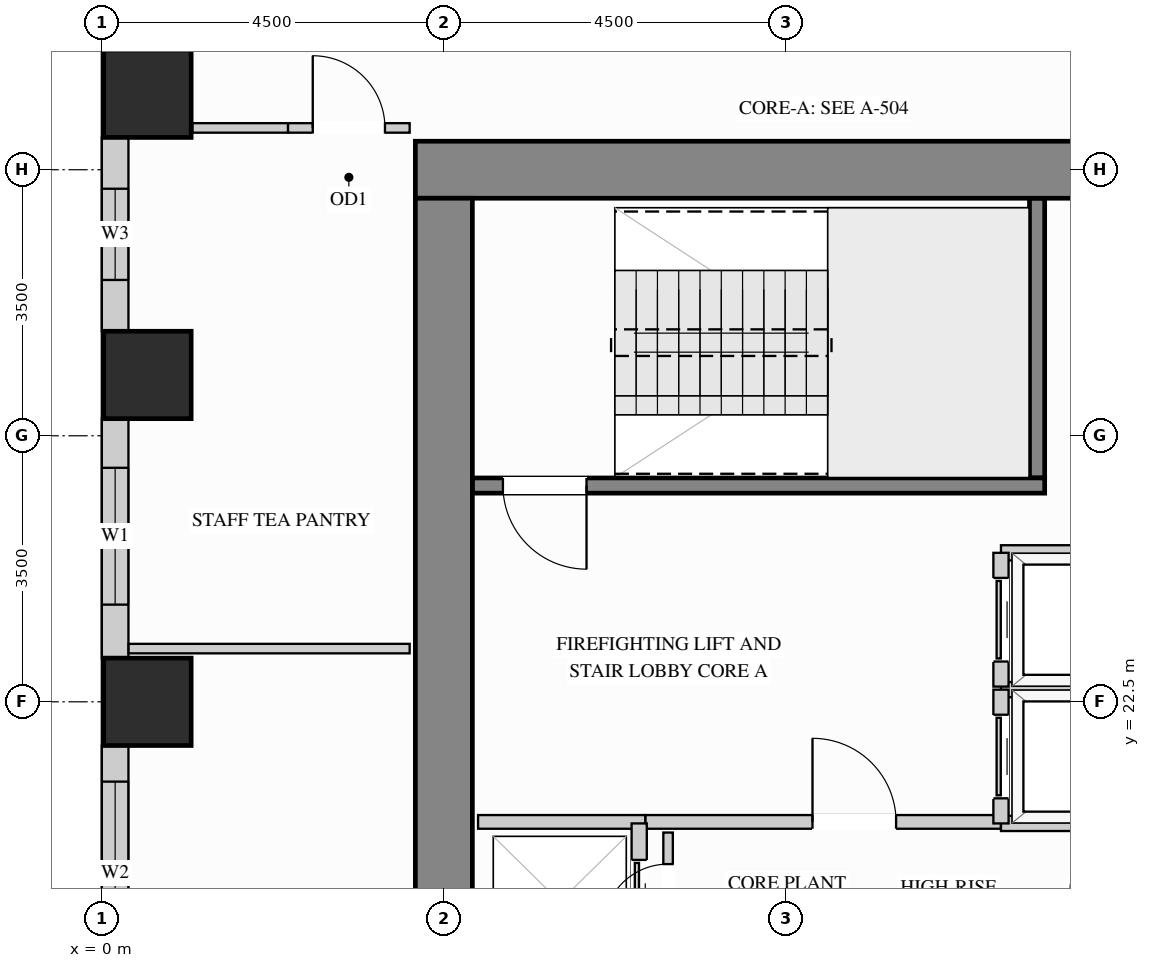
"""IFC4 building model, lengths in metres.
Left out: names, types, materials, properties, quantities, classifications, styles, units other than length and angle.
Written with IfcOpenShell. Run it as: python <this file> out.ifc"""

import sys

from ifc_helpers import new_model, si_unit, direction, frame, frame_2d, origin, origin_2d, place, context, subcontext, project, spatial, rectangle, extrude, source, transform, mapped, element, fill, save


model = new_model("IFC4")
c1 = context("Model", 3, precision=1e-05, world=origin(), true_north=direction((0.0, 1.0)))
c2 = subcontext(c1, "Body", "Model", "MODEL_VIEW")
j1 = project(units=[si_unit("LENGTHUNIT", "METRE"), si_unit("PLANEANGLEUNIT", "RADIAN")], contexts=[c1])
p1 = place(None, origin())
s1 = spatial("IfcSite", under=j1, at=p1, CompositionType="ELEMENT")
p2 = place(p1, origin())
s2 = spatial("IfcBuilding", under=s1, at=p2, CompositionType="ELEMENT")
p3 = place(p2, frame((0.0, 0.0, 109.8)))
s3 = spatial("IfcBuildingStorey", under=s2, at=p3, CompositionType="ELEMENT", Elevation=109.8)
m1 = source(origin(), c2, "Body", "SweptSolid", [
    extrude(rectangle(XDim=1.15, YDim=1.15, at=origin_2d()), origin(), (0.0, 0.0, 1.0), 3.38),
])
for number, where, z_axis, x_axis in (
    (1, (0.6, 22.5, 0.0), (0.0, 0.0, 1.0), (1.0, 0.0, 0.0)),
    (2, (0.6, 26.8, 0.0), (0.0, 0.0, 1.0), (1.0, 0.0, 0.0)),
    (3, (0.6, 30.5, 0.0), (0.0, 0.0, 1.0), (1.0, 0.0, 0.0)),
):
    element("IfcColumn", number, at=place(p3, frame(where, z_axis=z_axis, x_axis=x_axis)), inside=s3, PredefinedType="COLUMN", context=c2, shape_type="MappedRepresentation", body=[
        mapped(m1, transform((0.0, 0.0, 0.0), x_axis=(1.0, 0.0, 0.0), y_axis=(0.0, 1.0, 0.0), z_axis=(0.0, 0.0, 1.0))),
    ])
m2 = source(origin(), c2, "Body", "SweptSolid", [
    extrude(rectangle(XDim=10.75, YDim=0.75, at=frame_2d((5.375, 0.0))), origin(), (0.0, 0.0, 1.0), 3.38),
])
p4 = place(p3, frame((4.125, 29.5, 0.0), z_axis=(0.0, 0.0, 1.0), x_axis=(1.0, 0.0, 0.0)))
e4 = element("IfcWall", 4, at=p4, inside=s3, PredefinedType="SHEAR", context=c2, shape_type="MappedRepresentation", body=[
    mapped(m2, transform((0.0, 0.0, 0.0), x_axis=(1.0, 0.0, 0.0), y_axis=(0.0, 1.0, 0.0), z_axis=(0.0, 0.0, 1.0))),
])
m3 = source(origin(), c2, "Body", "SweptSolid", [
    extrude(rectangle(XDim=20.25, YDim=0.75, at=frame_2d((10.125, 0.0))), origin(), (0.0, 0.0, 1.0), 3.38),
])
p5 = place(p3, frame((4.5, 8.875, 0.0), z_axis=(0.0, 0.0, 1.0), x_axis=(0.0, 1.0, 0.0)))
e5 = element("IfcWall", 5, at=p5, inside=s3, PredefinedType="SHEAR", context=c2, shape_type="MappedRepresentation", body=[
    mapped(m3, transform((0.0, 0.0, 0.0), x_axis=(1.0, 0.0, 0.0), y_axis=(0.0, 1.0, 0.0), z_axis=(0.0, 0.0, 1.0))),
])
p6 = place(p3, frame((0.175, 29.927, 0.0), z_axis=(0.0, 0.0, 1.0), x_axis=(0.0, -1.0, 0.0)))
e6 = element("IfcWall", 6, at=p6, inside=s3, PredefinedType="SOLIDWALL", context=c2, shape_type="SweptSolid", body=[
    extrude(rectangle(XDim=2.554, YDim=0.35, at=frame_2d((1.277, 0.0))), origin(), (0.0, 0.0, 1.0), 3.365),
])
p7 = place(p6, frame((0.677, 0.0, 0.78)))
e7 = element("IfcOpeningElement", 7, at=p7, cuts=e6, PredefinedType="OPENING", context=c2, shape_type="SweptSolid", body=[
    extrude(rectangle(XDim=1.2, YDim=2.1, at=frame_2d((0.6, 1.05))), frame((0.0, 0.185, 0.0), z_axis=(0.0, -1.0, 0.0), x_axis=(1.0, 0.0, 0.0)), (0.0, 0.0, 1.0), 0.37),
])
p8 = place(p3, frame((0.175, 26.227, 0.0), z_axis=(0.0, 0.0, 1.0), x_axis=(0.0, -1.0, 0.0)))
e8 = element("IfcWall", 8, at=p8, inside=s3, PredefinedType="SOLIDWALL", context=c2, shape_type="SweptSolid", body=[
    extrude(rectangle(XDim=3.154, YDim=0.35, at=frame_2d((1.577, 0.0))), origin(), (0.0, 0.0, 1.0), 3.365),
])
p9 = place(p8, frame((0.648, 0.0, 0.78)))
e9 = element("IfcOpeningElement", 9, at=p9, cuts=e8, PredefinedType="OPENING", context=c2, shape_type="SweptSolid", body=[
    extrude(rectangle(XDim=1.8, YDim=2.1, at=frame_2d((0.9, 1.05))), frame((0.0, 0.185, 0.0), z_axis=(0.0, -1.0, 0.0), x_axis=(1.0, 0.0, 0.0)), (0.0, 0.0, 1.0), 0.37),
])
p10 = place(p3, frame((0.175, 21.927, 0.0), z_axis=(0.0, 0.0, 1.0), x_axis=(0.0, -1.0, 0.0)))
e10 = element("IfcWall", 10, at=p10, inside=s3, PredefinedType="SOLIDWALL", context=c2, shape_type="SweptSolid", body=[
    extrude(rectangle(XDim=3.354, YDim=0.35, at=frame_2d((1.677, 0.0))), origin(), (0.0, 0.0, 1.0), 3.365),
])
p11 = place(p10, frame((0.477, 0.0, 0.78)))
e11 = element("IfcOpeningElement", 11, at=p11, cuts=e10, PredefinedType="OPENING", context=c2, shape_type="SweptSolid", body=[
    extrude(rectangle(XDim=2.4, YDim=2.1, at=frame_2d((1.2, 1.05))), frame((0.0, 0.185, 0.0), z_axis=(0.0, -1.0, 0.0), x_axis=(1.0, 0.0, 0.0)), (0.0, 0.0, 1.0), 0.37),
])
p12 = place(p3, frame((7.15, 20.92, 0.0), z_axis=(0.0, 0.0, 1.0), x_axis=(1.0, 0.0, 0.0)))
e12 = element("IfcWall", 12, at=p12, inside=s3, PredefinedType="PARTITIONING", context=c2, shape_type="SweptSolid", body=[
    extrude(rectangle(XDim=4.68, YDim=0.18, at=frame_2d((2.34, 0.0))), origin(), (0.0, 0.0, 1.0), 3.365),
])
p13 = place(p12, frame((2.2, 0.0, 0.0)))
e13 = element("IfcOpeningElement", 13, at=p13, cuts=e12, PredefinedType="OPENING", context=c2, shape_type="SweptSolid", body=[
    extrude(rectangle(XDim=1.1, YDim=2.15, at=frame_2d((0.55, 1.075))), frame((0.0, 0.1, 0.0), z_axis=(0.0, -1.0, 0.0), x_axis=(1.0, 0.0, 0.0)), (0.0, 0.0, 1.0), 0.2),
])
m4 = source(origin(), c2, "Body", "SweptSolid", [
    extrude(rectangle(XDim=2.2, YDim=0.18, at=frame_2d((1.1, 0.0))), origin(), (0.0, 0.0, 1.0), 3.365),
])
p14 = place(p3, frame((4.95, 20.92, 0.0), z_axis=(0.0, 0.0, 1.0), x_axis=(1.0, 0.0, 0.0)))
e14 = element("IfcWall", 14, at=p14, inside=s3, PredefinedType="PARTITIONING", context=c2, shape_type="MappedRepresentation", body=[
    mapped(m4, transform((0.0, 0.0, 0.0), x_axis=(1.0, 0.0, 0.0), y_axis=(0.0, 1.0, 0.0), z_axis=(0.0, 0.0, 1.0))),
])
p15 = place(p3, frame((7.45, 19.2, 0.0), z_axis=(0.0, 0.0, 1.0), x_axis=(0.0, 1.0, 0.0)))
e15 = element("IfcWall", 15, at=p15, inside=s3, PredefinedType="PARTITIONING", context=c2, shape_type="SweptSolid", body=[
    extrude(rectangle(XDim=1.58, YDim=0.125, at=frame_2d((0.79, 0.0))), origin(), (0.0, 0.0, 1.0), 3.365),
])
p16 = place(p15, frame((0.315, 0.0, 0.0)))
e16 = element("IfcOpeningElement", 16, at=p16, cuts=e15, PredefinedType="OPENING", context=c2, shape_type="SweptSolid", body=[
    extrude(rectangle(XDim=0.85, YDim=2.1, at=frame_2d((0.425, 1.05))), frame((0.0, 0.073, 0.0), z_axis=(0.0, -1.0, 0.0), x_axis=(1.0, 0.0, 0.0)), (0.0, 0.0, 1.0), 0.145),
])
m5 = source(origin(), c2, "Body", "SweptSolid", [
    extrude(rectangle(XDim=1.26, YDim=0.125, at=frame_2d((0.63, 0.0))), origin(), (0.0, 0.0, 1.0), 3.365),
])
p17 = place(p3, frame((1.19, 30.05, 0.0), z_axis=(0.0, 0.0, 1.0), x_axis=(1.0, 0.0, 0.0)))
e17 = element("IfcWall", 17, at=p17, inside=s3, PredefinedType="PARTITIONING", context=c2, shape_type="MappedRepresentation", body=[
    mapped(m5, transform((0.0, 0.0, 0.0), x_axis=(1.0, 0.0, 0.0), y_axis=(0.0, 1.0, 0.0), z_axis=(0.0, 0.0, 1.0))),
])
p18 = place(p3, frame((2.45, 30.05, 0.0), z_axis=(0.0, 0.0, 1.0), x_axis=(1.0, 0.0, 0.0)))
e18 = element("IfcWall", 18, at=p18, inside=s3, PredefinedType="PARTITIONING", context=c2, shape_type="SweptSolid", body=[
    extrude(rectangle(XDim=1.6, YDim=0.125, at=frame_2d((0.8, 0.0))), origin(), (0.0, 0.0, 1.0), 3.365),
])
p19 = place(p18, frame((0.325, 0.0, 0.0)))
e19 = element("IfcOpeningElement", 19, at=p19, cuts=e18, PredefinedType="OPENING", context=c2, shape_type="SweptSolid", body=[
    extrude(rectangle(XDim=0.95, YDim=2.15, at=frame_2d((0.475, 1.075))), frame((0.0, 0.073, 0.0), z_axis=(0.0, -1.0, 0.0), x_axis=(1.0, 0.0, 0.0)), (0.0, 0.0, 1.0), 0.145),
])
m6 = source(origin(), c2, "Body", "SweptSolid", [
    extrude(rectangle(XDim=3.698, YDim=0.125, at=frame_2d((1.849, 0.0))), origin(), (0.0, 0.0, 1.0), 3.365),
])
p20 = place(p3, frame((0.352, 23.2, 0.0), z_axis=(0.0, 0.0, 1.0), x_axis=(1.0, 0.0, 0.0)))
e20 = element("IfcWall", 20, at=p20, inside=s3, PredefinedType="PARTITIONING", context=c2, shape_type="MappedRepresentation", body=[
    mapped(m6, transform((0.0, 0.0, 0.0), x_axis=(1.0, 0.0, 0.0), y_axis=(0.0, 1.0, 0.0), z_axis=(0.0, 0.0, 1.0))),
])
m7 = source(origin(), c2, "Body", "SweptSolid", [
    extrude(rectangle(XDim=2.265, YDim=0.2, at=frame_2d((1.132, 0.0))), origin(), (0.0, 0.0, 1.0), 3.365),
])
for number, where, z_axis, x_axis in (
    (21, (11.83, 22.66, 0.0), (0.0, 0.0, 1.0), (1.0, 0.0, 0.0)),
    (22, (11.83, 20.9, 0.0), (0.0, 0.0, 1.0), (1.0, 0.0, 0.0)),
):
    element("IfcWall", number, at=place(p3, frame(where, z_axis=z_axis, x_axis=x_axis)), inside=s3, PredefinedType="PARTITIONING", context=c2, shape_type="MappedRepresentation", body=[
        mapped(m7, transform((0.0, 0.0, 0.0), x_axis=(1.0, 0.0, 0.0), y_axis=(0.0, 1.0, 0.0), z_axis=(0.0, 0.0, 1.0))),
    ])
p21 = place(p3, frame((11.83, 20.9, 0.0), z_axis=(0.0, 0.0, 1.0), x_axis=(0.0, 1.0, 0.0)))
e23 = element("IfcWall", 23, at=p21, inside=s3, PredefinedType="PARTITIONING", context=c2, shape_type="SweptSolid", body=[
    extrude(rectangle(XDim=1.76, YDim=0.2, at=frame_2d((0.88, 0.0))), origin(), (0.0, 0.0, 1.0), 3.365),
])
p22 = place(p21, frame((0.33, 0.0, 0.0)))
e24 = element("IfcOpeningElement", 24, at=p22, cuts=e23, PredefinedType="OPENING", context=c2, shape_type="SweptSolid", body=[
    extrude(rectangle(XDim=1.1, YDim=2.2, at=frame_2d((0.55, 1.1))), frame((0.0, 0.11, 0.0), z_axis=(0.0, -1.0, 0.0), x_axis=(1.0, 0.0, 0.0)), (0.0, 0.0, 1.0), 0.22),
])
p23 = place(p3, frame((11.83, 24.46, 0.0), z_axis=(0.0, 0.0, 1.0), x_axis=(1.0, 0.0, 0.0)))
e25 = element("IfcWall", 25, at=p23, inside=s3, PredefinedType="PARTITIONING", context=c2, shape_type="MappedRepresentation", body=[
    mapped(m7, transform((0.0, 0.0, 0.0), x_axis=(1.0, 0.0, 0.0), y_axis=(0.0, 1.0, 0.0), z_axis=(0.0, 0.0, 1.0))),
])
p24 = place(p3, frame((11.83, 22.7, 0.0), z_axis=(0.0, 0.0, 1.0), x_axis=(0.0, 1.0, 0.0)))
e26 = element("IfcWall", 26, at=p24, inside=s3, PredefinedType="PARTITIONING", context=c2, shape_type="SweptSolid", body=[
    extrude(rectangle(XDim=1.76, YDim=0.2, at=frame_2d((0.88, 0.0))), origin(), (0.0, 0.0, 1.0), 3.365),
])
p25 = place(p24, frame((0.33, 0.0, 0.0)))
e27 = element("IfcOpeningElement", 27, at=p25, cuts=e26, PredefinedType="OPENING", context=c2, shape_type="SweptSolid", body=[
    extrude(rectangle(XDim=1.1, YDim=2.2, at=frame_2d((0.55, 1.1))), frame((0.0, 0.11, 0.0), z_axis=(0.0, -1.0, 0.0), x_axis=(1.0, 0.0, 0.0)), (0.0, 0.0, 1.0), 0.22),
])
p26 = place(p3, frame((7.07, 18.84, 0.0), z_axis=(0.0, 0.0, 1.0), x_axis=(0.0, 1.0, 0.0)))
e28 = element("IfcWall", 28, at=p26, inside=s3, PredefinedType="PARTITIONING", context=c2, shape_type="SweptSolid", body=[
    extrude(rectangle(XDim=2.06, YDim=0.2, at=frame_2d((1.03, 0.0))), origin(), (0.0, 0.0, 1.0), 3.365),
])
p27 = place(p26, frame((0.48, 0.0, 0.0)))
e29 = element("IfcOpeningElement", 29, at=p27, cuts=e28, PredefinedType="OPENING", context=c2, shape_type="SweptSolid", body=[
    extrude(rectangle(XDim=1.1, YDim=2.2, at=frame_2d((0.55, 1.1))), frame((0.0, 0.11, 0.0), z_axis=(0.0, -1.0, 0.0), x_axis=(1.0, 0.0, 0.0)), (0.0, 0.0, 1.0), 0.22),
])
m8 = source(origin(), c2, "Body", "SweptSolid", [
    extrude(rectangle(XDim=3.678, YDim=0.2, at=frame_2d((1.839, 0.0))), origin(), (0.0, 0.0, 1.0), 3.38),
])
p28 = place(p3, frame((12.305, 25.445, 0.0), z_axis=(0.0, 0.0, 1.0), x_axis=(0.0, 1.0, 0.0)))
e30 = element("IfcWall", 30, at=p28, inside=s3, PredefinedType="SHEAR", context=c2, shape_type="MappedRepresentation", body=[
    mapped(m8, transform((0.0, 0.0, 0.0), x_axis=(1.0, 0.0, 0.0), y_axis=(0.0, 1.0, 0.0), z_axis=(0.0, 0.0, 1.0))),
])
p29 = place(p3, frame((4.877, 25.345, 0.0), z_axis=(0.0, 0.0, 1.0), x_axis=(1.0, 0.0, 0.0)))
e31 = element("IfcWall", 31, at=p29, inside=s3, PredefinedType="SHEAR", context=c2, shape_type="SweptSolid", body=[
    extrude(rectangle(XDim=7.528, YDim=0.2, at=frame_2d((3.764, 0.0))), origin(), (0.0, 0.0, 1.0), 3.38),
])
p30 = place(p29, frame((0.4, 0.0, 0.0)))
e32 = element("IfcOpeningElement", 32, at=p30, cuts=e31, PredefinedType="OPENING", context=c2, shape_type="SweptSolid", body=[
    extrude(rectangle(XDim=1.1, YDim=2.15, at=frame_2d((0.55, 1.075))), frame((0.0, 0.11, 0.0), z_axis=(0.0, -1.0, 0.0), x_axis=(1.0, 0.0, 0.0)), (0.0, 0.0, 1.0), 0.22),
])
m9 = source(origin(), c2, "Body", "SweptSolid", [
    extrude(rectangle(XDim=1.1, YDim=2.15, at=frame_2d((0.55, 1.075))), frame((0.0, 0.025, 0.0), z_axis=(0.0, -1.0, 0.0), x_axis=(1.0, 0.0, 0.0)), (0.0, 0.0, 1.0), 0.05),
])
p31 = place(p13, origin())
e33 = element("IfcDoor", 33, at=p31, inside=s3, OperationType="SINGLE_SWING_LEFT", PredefinedType="DOOR", context=c2, shape_type="MappedRepresentation", body=[
    mapped(m9, transform((0.0, 0.0, 0.0), x_axis=(1.0, 0.0, 0.0), y_axis=(0.0, 1.0, 0.0), z_axis=(0.0, 0.0, 1.0))),
])
fill(e13, e33)
m10 = source(origin(), c2, "Body", "SweptSolid", [
    extrude(rectangle(XDim=1.1, YDim=2.2, at=frame_2d((0.55, 1.1))), frame((0.0, 0.025, 0.0), z_axis=(0.0, -1.0, 0.0), x_axis=(1.0, 0.0, 0.0)), (0.0, 0.0, 1.0), 0.05),
])
p32 = place(p22, origin())
e34 = element("IfcDoor", 34, at=p32, inside=s3, OperationType="SLIDING_TO_LEFT", PredefinedType="DOOR", context=c2, shape_type="MappedRepresentation", body=[
    mapped(m10, transform((0.0, 0.0, 0.0), x_axis=(1.0, 0.0, 0.0), y_axis=(0.0, 1.0, 0.0), z_axis=(0.0, 0.0, 1.0))),
])
fill(e24, e34)
p33 = place(p25, origin())
e35 = element("IfcDoor", 35, at=p33, inside=s3, OperationType="SLIDING_TO_LEFT", PredefinedType="DOOR", context=c2, shape_type="MappedRepresentation", body=[
    mapped(m10, transform((0.0, 0.0, 0.0), x_axis=(1.0, 0.0, 0.0), y_axis=(0.0, 1.0, 0.0), z_axis=(0.0, 0.0, 1.0))),
])
fill(e27, e35)
p34 = place(p27, origin())
e36 = element("IfcDoor", 36, at=p34, inside=s3, OperationType="SLIDING_TO_LEFT", PredefinedType="DOOR", context=c2, shape_type="MappedRepresentation", body=[
    mapped(m10, transform((0.0, 0.0, 0.0), x_axis=(1.0, 0.0, 0.0), y_axis=(0.0, 1.0, 0.0), z_axis=(0.0, 0.0, 1.0))),
])
fill(e29, e36)
m11 = source(origin(), c2, "Body", "SweptSolid", [
    extrude(rectangle(XDim=0.95, YDim=2.15, at=frame_2d((0.475, 1.075))), frame((0.0, 0.025, 0.0), z_axis=(0.0, -1.0, 0.0), x_axis=(1.0, 0.0, 0.0)), (0.0, 0.0, 1.0), 0.05),
])
p35 = place(p19, origin())
e37 = element("IfcDoor", 37, at=p35, inside=s3, OperationType="SINGLE_SWING_LEFT", PredefinedType="DOOR", context=c2, shape_type="MappedRepresentation", body=[
    mapped(m11, transform((0.0, 0.0, 0.0), x_axis=(1.0, 0.0, 0.0), y_axis=(0.0, 1.0, 0.0), z_axis=(0.0, 0.0, 1.0))),
])
fill(e19, e37)
m12 = source(origin(), c2, "Body", "SweptSolid", [
    extrude(rectangle(XDim=0.85, YDim=2.1, at=frame_2d((0.425, 1.05))), frame((0.0, 0.025, 0.0), z_axis=(0.0, -1.0, 0.0), x_axis=(1.0, 0.0, 0.0)), (0.0, 0.0, 1.0), 0.05),
])
p36 = place(p16, origin())
e38 = element("IfcDoor", 38, at=p36, inside=s3, OperationType="SINGLE_SWING_LEFT", PredefinedType="DOOR", context=c2, shape_type="MappedRepresentation", body=[
    mapped(m12, transform((0.0, 0.0, 0.0), x_axis=(1.0, 0.0, 0.0), y_axis=(0.0, 1.0, 0.0), z_axis=(0.0, 0.0, 1.0))),
])
fill(e16, e38)
m13 = source(origin(), c2, "Body", "SweptSolid", [
    extrude(rectangle(XDim=1.1, YDim=2.15, at=frame_2d((0.55, 1.075))), frame((0.0, 0.025, 0.0), z_axis=(0.0, -1.0, 0.0), x_axis=(1.0, 0.0, 0.0)), (0.0, 0.0, 1.0), 0.05),
])
p37 = place(p30, origin())
e39 = element("IfcDoor", 39, at=p37, inside=s3, OperationType="SINGLE_SWING_RIGHT", PredefinedType="DOOR", context=c2, shape_type="MappedRepresentation", body=[
    mapped(m13, transform((0.0, 0.0, 0.0), x_axis=(1.0, 0.0, 0.0), y_axis=(0.0, 1.0, 0.0), z_axis=(0.0, 0.0, 1.0))),
])
fill(e32, e39)
m14 = source(origin(), c2, "Body", "SweptSolid", [
    extrude(rectangle(XDim=1.8, YDim=2.1, at=frame_2d((0.9, 1.05))), frame((0.0, 0.03, 0.0), z_axis=(0.0, -1.0, 0.0), x_axis=(1.0, 0.0, 0.0)), (0.0, 0.0, 1.0), 0.06),
])
p38 = place(p9, origin())
e40 = element("IfcWindow", 40, at=p38, inside=s3, PartitioningType="SINGLE_PANEL", PredefinedType="WINDOW", context=c2, shape_type="MappedRepresentation", body=[
    mapped(m14, transform((0.0, 0.0, 0.0), x_axis=(1.0, 0.0, 0.0), y_axis=(0.0, 1.0, 0.0), z_axis=(0.0, 0.0, 1.0))),
])
fill(e9, e40)
m15 = source(origin(), c2, "Body", "SweptSolid", [
    extrude(rectangle(XDim=2.4, YDim=2.1, at=frame_2d((1.2, 1.05))), frame((0.0, 0.03, 0.0), z_axis=(0.0, -1.0, 0.0), x_axis=(1.0, 0.0, 0.0)), (0.0, 0.0, 1.0), 0.06),
])
p39 = place(p11, origin())
e41 = element("IfcWindow", 41, at=p39, inside=s3, PartitioningType="SINGLE_PANEL", PredefinedType="WINDOW", context=c2, shape_type="MappedRepresentation", body=[
    mapped(m15, transform((0.0, 0.0, 0.0), x_axis=(1.0, 0.0, 0.0), y_axis=(0.0, 1.0, 0.0), z_axis=(0.0, 0.0, 1.0))),
])
fill(e11, e41)
m16 = source(origin(), c2, "Body", "SweptSolid", [
    extrude(rectangle(XDim=1.2, YDim=2.1, at=frame_2d((0.6, 1.05))), frame((0.0, 0.03, 0.0), z_axis=(0.0, -1.0, 0.0), x_axis=(1.0, 0.0, 0.0)), (0.0, 0.0, 1.0), 0.06),
])
p40 = place(p7, origin())
e42 = element("IfcWindow", 42, at=p40, inside=s3, PartitioningType="SINGLE_PANEL", PredefinedType="WINDOW", context=c2, shape_type="MappedRepresentation", body=[
    mapped(m16, transform((0.0, 0.0, 0.0), x_axis=(1.0, 0.0, 0.0), y_axis=(0.0, 1.0, 0.0), z_axis=(0.0, 0.0, 1.0))),
])
fill(e7, e42)
save(model, sys.argv[1])
